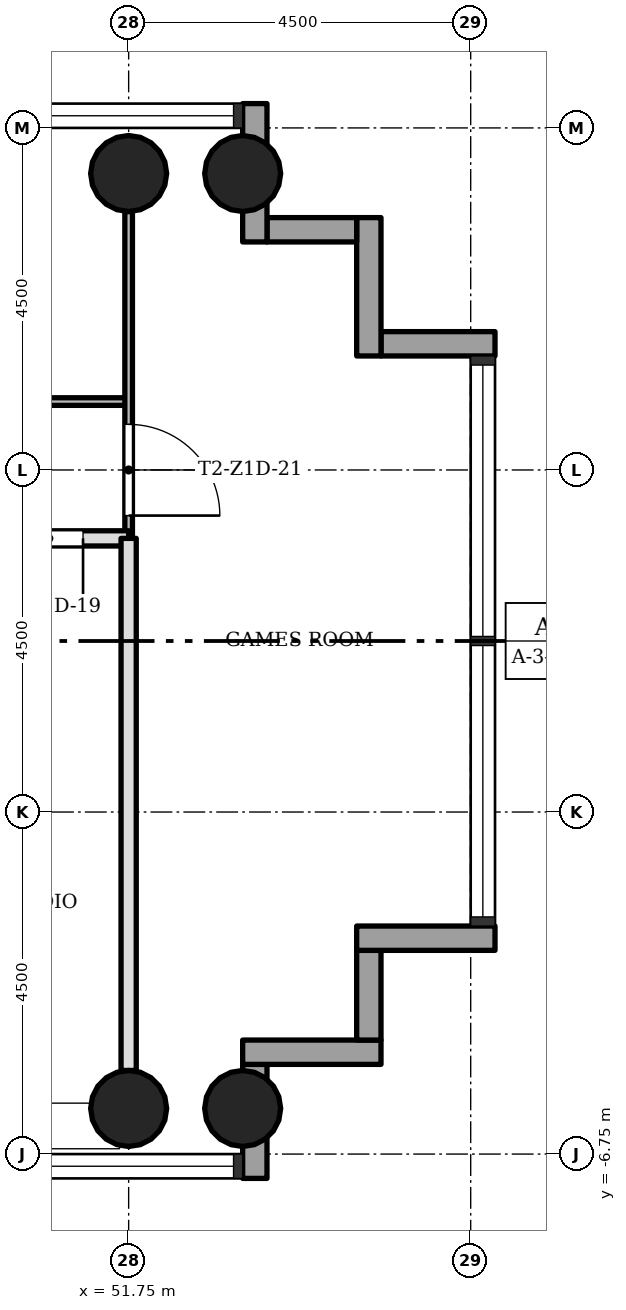
"""IFC4 building model, lengths in metres.
Left out: names, types, materials, properties, quantities, classifications, styles, units other than length and angle.
Written with IfcOpenShell. Run it as: python <this file> out.ifc"""

import sys

from ifc_helpers import new_model, si_unit, direction, frame, frame_2d, origin, origin_2d, place, context, subcontext, project, spatial, rectangle, hollow_circle, extrude, element, fill, save


model = new_model("IFC4")
c1 = context("Model", 3, precision=1e-05, world=origin(), true_north=direction((0.0, 1.0)))
c2 = subcontext(c1, "Body", "Model", "MODEL_VIEW")
j1 = project(units=[si_unit("LENGTHUNIT", "METRE"), si_unit("PLANEANGLEUNIT", "RADIAN")], contexts=[c1])
p1 = place(None, origin())
s1 = spatial("IfcSite", under=j1, at=p1, CompositionType="ELEMENT")
p2 = place(p1, origin())
s2 = spatial("IfcBuilding", under=s1, at=p2, CompositionType="ELEMENT")
p3 = place(p2, frame((0.0, 0.0, 55.1)))
s3 = spatial("IfcBuildingStorey", under=s2, at=p3, CompositionType="ELEMENT", Elevation=55.1)
for number, where, z_axis, x_axis in (
    (1, (51.75, -6.15, 0.0), (0.0, 0.0, 1.0), (1.0, 0.0, 0.0)),
    (2, (51.75, 6.15, 0.0), (0.0, 0.0, 1.0), (1.0, 0.0, 0.0)),
    (3, (53.25, -6.15, 0.0), (0.0, 0.0, 1.0), (1.0, 0.0, 0.0)),
    (4, (53.25, 6.15, 0.0), (0.0, 0.0, 1.0), (1.0, 0.0, 0.0)),
):
    element("IfcColumn", number, at=place(p3, frame(where, z_axis=z_axis, x_axis=x_axis)), inside=s3, PredefinedType="COLUMN", context=c2, shape_type="SweptSolid", body=[
        extrude(hollow_circle(Radius=0.5, WallThickness=0.036, at=origin_2d()), origin(), (0.0, 0.0, 1.0), 3.4),
    ])
p4 = place(p3, frame((53.41, -7.07, -0.3), z_axis=(0.0, 0.0, 1.0), x_axis=(0.0, 1.0, 0.0)))
e5 = element("IfcWall", 5, at=p4, inside=s3, PredefinedType="STANDARD", context=c2, shape_type="SweptSolid", body=[
    extrude(rectangle(XDim=1.5, YDim=0.32, at=frame_2d((0.75, 0.0))), origin(), (0.0, 0.0, 1.0), 3.4),
])
p5 = place(p3, frame((53.25, -5.41, -0.3), z_axis=(0.0, 0.0, 1.0), x_axis=(1.0, 0.0, 0.0)))
e6 = element("IfcWall", 6, at=p5, inside=s3, PredefinedType="STANDARD", context=c2, shape_type="SweptSolid", body=[
    extrude(rectangle(XDim=1.82, YDim=0.32, at=frame_2d((0.91, 0.0))), origin(), (0.0, 0.0, 1.0), 3.4),
])
p6 = place(p3, frame((54.91, -5.25, -0.3), z_axis=(0.0, 0.0, 1.0), x_axis=(0.0, 1.0, 0.0)))
e7 = element("IfcWall", 7, at=p6, inside=s3, PredefinedType="STANDARD", context=c2, shape_type="SweptSolid", body=[
    extrude(rectangle(XDim=1.18, YDim=0.32, at=frame_2d((0.59, 0.0))), origin(), (0.0, 0.0, 1.0), 3.4),
])
p7 = place(p3, frame((54.75, -3.91, -0.3), z_axis=(0.0, 0.0, 1.0), x_axis=(1.0, 0.0, 0.0)))
e8 = element("IfcWall", 8, at=p7, inside=s3, PredefinedType="STANDARD", context=c2, shape_type="SweptSolid", body=[
    extrude(rectangle(XDim=1.82, YDim=0.32, at=frame_2d((0.91, 0.0))), origin(), (0.0, 0.0, 1.0), 3.4),
])
p8 = place(p3, frame((56.57, 3.91, -0.3), z_axis=(0.0, 0.0, 1.0), x_axis=(-1.0, 0.0, 0.0)))
e9 = element("IfcWall", 9, at=p8, inside=s3, PredefinedType="STANDARD", context=c2, shape_type="SweptSolid", body=[
    extrude(rectangle(XDim=1.5, YDim=0.32, at=frame_2d((0.75, 0.0))), origin(), (0.0, 0.0, 1.0), 3.4),
])
p9 = place(p3, frame((54.91, 3.75, -0.3), z_axis=(0.0, 0.0, 1.0), x_axis=(0.0, 1.0, 0.0)))
e10 = element("IfcWall", 10, at=p9, inside=s3, PredefinedType="STANDARD", context=c2, shape_type="SweptSolid", body=[
    extrude(rectangle(XDim=1.82, YDim=0.32, at=frame_2d((0.91, 0.0))), origin(), (0.0, 0.0, 1.0), 3.4),
])
p10 = place(p3, frame((54.75, 5.41, -0.3), z_axis=(0.0, 0.0, 1.0), x_axis=(-1.0, 0.0, 0.0)))
e11 = element("IfcWall", 11, at=p10, inside=s3, PredefinedType="STANDARD", context=c2, shape_type="SweptSolid", body=[
    extrude(rectangle(XDim=1.18, YDim=0.32, at=frame_2d((0.59, 0.0))), origin(), (0.0, 0.0, 1.0), 3.4),
])
p11 = place(p3, frame((53.41, 5.25, -0.3), z_axis=(0.0, 0.0, 1.0), x_axis=(0.0, 1.0, 0.0)))
e12 = element("IfcWall", 12, at=p11, inside=s3, PredefinedType="STANDARD", context=c2, shape_type="SweptSolid", body=[
    extrude(rectangle(XDim=1.82, YDim=0.32, at=frame_2d((0.91, 0.0))), origin(), (0.0, 0.0, 1.0), 3.4),
])
p12 = place(p3, frame((51.75, 1.35, 0.0), z_axis=(0.0, 0.0, 1.0), x_axis=(-1.0, 0.0, 0.0)))
e13 = element("IfcWall", 13, at=p12, inside=s3, PredefinedType="SOLIDWALL", context=c2, shape_type="SweptSolid", body=[
    extrude(rectangle(XDim=4.5, YDim=0.2, at=frame_2d((2.25, 0.0))), origin(), (0.0, 0.0, 1.0), 3.0),
])
p13 = place(p12, frame((0.6, 0.0, 0.0)))
e14 = element("IfcOpeningElement", 14, at=p13, cuts=e13, PredefinedType="OPENING", context=c2, shape_type="SweptSolid", body=[
    extrude(rectangle(XDim=0.9, YDim=2.1, at=frame_2d((0.45, 1.05))), frame((0.0, 0.11, 0.0), z_axis=(0.0, -1.0, 0.0), x_axis=(1.0, 0.0, 0.0)), (0.0, 0.0, 1.0), 0.22),
])
p14 = place(p3, frame((51.75, 3.15, 0.0), z_axis=(0.0, 0.0, 1.0), x_axis=(-1.0, 0.0, 0.0)))
e15 = element("IfcWall", 15, at=p14, inside=s3, PredefinedType="PARTITIONING", context=c2, shape_type="SweptSolid", body=[
    extrude(rectangle(XDim=9.0, YDim=0.1, at=frame_2d((4.5, 0.0))), origin(), (0.0, 0.0, 1.0), 3.0),
])
p15 = place(p14, frame((6.3, 0.0, 0.0)))
e16 = element("IfcOpeningElement", 16, at=p15, cuts=e15, PredefinedType="OPENING", context=c2, shape_type="SweptSolid", body=[
    extrude(rectangle(XDim=0.9, YDim=2.1, at=frame_2d((0.45, 1.05))), frame((0.0, 0.06, 0.0), z_axis=(0.0, -1.0, 0.0), x_axis=(1.0, 0.0, 0.0)), (0.0, 0.0, 1.0), 0.12),
])
p16 = place(p14, frame((1.8, 0.0, 0.0)))
e17 = element("IfcOpeningElement", 17, at=p16, cuts=e15, PredefinedType="OPENING", context=c2, shape_type="SweptSolid", body=[
    extrude(rectangle(XDim=0.9, YDim=2.1, at=frame_2d((0.45, 1.05))), frame((0.0, 0.06, 0.0), z_axis=(0.0, -1.0, 0.0), x_axis=(1.0, 0.0, 0.0)), (0.0, 0.0, 1.0), 0.12),
])
p17 = place(p3, frame((51.75, 1.35, 0.0), z_axis=(0.0, 0.0, 1.0), x_axis=(0.0, 1.0, 0.0)))
e18 = element("IfcWall", 18, at=p17, inside=s3, PredefinedType="PARTITIONING", context=c2, shape_type="SweptSolid", body=[
    extrude(rectangle(XDim=4.3, YDim=0.1, at=frame_2d((2.15, 0.0))), origin(), (0.0, 0.0, 1.0), 3.0),
])
p18 = place(p17, frame((0.3, 0.0, 0.0)))
e19 = element("IfcOpeningElement", 19, at=p18, cuts=e18, PredefinedType="OPENING", context=c2, shape_type="SweptSolid", body=[
    extrude(rectangle(XDim=1.2, YDim=2.1, at=frame_2d((0.6, 1.05))), frame((0.0, 0.06, 0.0), z_axis=(0.0, -1.0, 0.0), x_axis=(1.0, 0.0, 0.0)), (0.0, 0.0, 1.0), 0.12),
])
p19 = place(p3, frame((51.75, -5.65, 0.0), z_axis=(0.0, 0.0, 1.0), x_axis=(0.0, 1.0, 0.0)))
e20 = element("IfcWall", 20, at=p19, inside=s3, PredefinedType="SOLIDWALL", context=c2, shape_type="SweptSolid", body=[
    extrude(rectangle(XDim=7.0, YDim=0.2, at=frame_2d((3.5, 0.0))), origin(), (0.0, 0.0, 1.0), 3.0),
])
p20 = place(p13, origin())
e21 = element("IfcDoor", 21, at=p20, inside=s3, OperationType="SINGLE_SWING_RIGHT", PredefinedType="DOOR", context=c2, shape_type="SweptSolid", body=[
    extrude(rectangle(XDim=0.9, YDim=2.1, at=frame_2d((0.45, 1.05))), frame((0.0, 0.025, 0.0), z_axis=(0.0, -1.0, 0.0), x_axis=(1.0, 0.0, 0.0)), (0.0, 0.0, 1.0), 0.05),
])
fill(e14, e21)
p21 = place(p18, origin())
e22 = element("IfcDoor", 22, at=p21, inside=s3, OperationType="SINGLE_SWING_LEFT", PredefinedType="DOOR", context=c2, shape_type="SweptSolid", body=[
    extrude(rectangle(XDim=1.2, YDim=2.1, at=frame_2d((0.6, 1.05))), frame((0.0, 0.025, 0.0), z_axis=(0.0, -1.0, 0.0), x_axis=(1.0, 0.0, 0.0)), (0.0, 0.0, 1.0), 0.05),
])
fill(e19, e22)
save(model, sys.argv[1])
